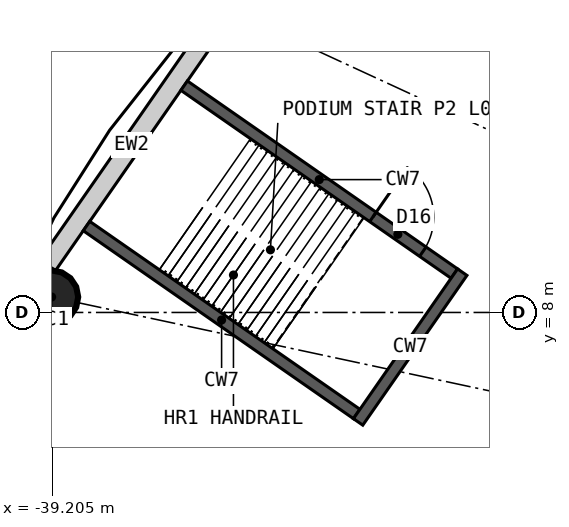
"""IFC4 building model, lengths in metres.
Left out: names, types, materials, properties, quantities, classifications, styles, units other than length and angle.
Written with IfcOpenShell. Run it as: python <this file> out.ifc"""

import sys

from ifc_helpers import new_model, si_unit, direction, frame, frame_2d, origin, origin_2d, place, context, subcontext, project, spatial, rectangle, circle, extrude, element, fill, save


model = new_model("IFC4")
c1 = context("Model", 3, precision=1e-05, world=origin(), true_north=direction((0.0, 1.0)))
c2 = subcontext(c1, "Body", "Model", "MODEL_VIEW")
j1 = project(units=[si_unit("LENGTHUNIT", "METRE"), si_unit("PLANEANGLEUNIT", "RADIAN")], contexts=[c1])
p1 = place(None, origin())
s1 = spatial("IfcSite", under=j1, at=p1, CompositionType="ELEMENT")
p2 = place(p1, origin())
s2 = spatial("IfcBuilding", under=s1, at=p2, CompositionType="ELEMENT")
p3 = place(p2, frame((0.0, 0.0, 7.2)))
s3 = spatial("IfcBuildingStorey", under=s2, at=p3, CompositionType="ELEMENT", Elevation=7.2)
p4 = place(p3, frame((-39.218, 8.407, 0.0), z_axis=(0.0, 0.0, 1.0), x_axis=(1.0, 0.0, 0.0)))
e1 = element("IfcColumn", 1, at=p4, inside=s3, PredefinedType="COLUMN", context=c2, shape_type="SweptSolid", body=[
    extrude(circle(Radius=0.7, at=origin_2d()), origin(), (0.0, 0.0, 1.0), 6.6),
])
p5 = place(p3, frame((-34.905, 15.592, 0.0), z_axis=(0.0, 0.0, 1.0), x_axis=(-0.571029335057, -0.820929655028, 0.0)))
e2 = element("IfcWall", 2, at=p5, inside=s3, PredefinedType="SOLIDWALL", context=c2, shape_type="SweptSolid", body=[
    extrude(rectangle(XDim=7.733, YDim=0.5, at=frame_2d((3.866, 0.0))), origin(), (0.0, 0.0, 1.0), 6.35),
])
p6 = place(p3, frame((-35.729, 13.968, 0.0), z_axis=(0.0, 0.0, 1.0), x_axis=(0.82092761123, -0.571032273274, 0.0)))
e3 = element("IfcWall", 3, at=p6, inside=s3, PredefinedType="SHEAR", context=c2, shape_type="SweptSolid", body=[
    extrude(rectangle(XDim=8.66, YDim=0.3, at=frame_2d((4.33, 0.0))), origin(), (0.0, 0.0, 1.0), 6.6),
])
p7 = place(p6, frame((6.05, 0.0, 0.0)))
e4 = element("IfcOpeningElement", 4, at=p7, cuts=e3, PredefinedType="OPENING", context=c2, shape_type="SweptSolid", body=[
    extrude(rectangle(XDim=1.6, YDim=2.1, at=frame_2d((0.8, 1.05))), frame((0.0, 0.16, 0.0), z_axis=(0.0, -1.0, 0.0), x_axis=(1.0, 0.0, 0.0)), (0.0, 0.0, 1.0), 0.32),
])
p8 = place(p3, frame((-38.299, 10.274, 0.0), z_axis=(0.0, 0.0, 1.0), x_axis=(0.820936803751, -0.571019057692, 0.0)))
e5 = element("IfcWall", 5, at=p8, inside=s3, PredefinedType="SHEAR", context=c2, shape_type="SweptSolid", body=[
    extrude(rectangle(XDim=8.66, YDim=0.3, at=frame_2d((4.33, 0.0))), origin(), (0.0, 0.0, 1.0), 6.6),
])
p9 = place(p3, frame((-28.412, 9.06, 0.0), z_axis=(0.0, 0.0, 1.0), x_axis=(-0.571036173178, -0.820924898467, 0.0)))
e6 = element("IfcWall", 6, at=p9, inside=s3, PredefinedType="SHEAR", context=c2, shape_type="SweptSolid", body=[
    extrude(rectangle(XDim=4.8, YDim=0.3, at=frame_2d((2.4, 0.0))), origin(), (0.0, 0.0, 1.0), 6.6),
])
p10 = place(p7, origin())
e7 = element("IfcDoor", 7, at=p10, inside=s3, OperationType="SINGLE_SWING_LEFT", PredefinedType="DOOR", context=c2, shape_type="SweptSolid", body=[
    extrude(rectangle(XDim=1.6, YDim=2.1, at=frame_2d((0.8, 1.05))), frame((0.0, 0.025, 0.0), z_axis=(0.0, -1.0, 0.0), x_axis=(1.0, 0.0, 0.0)), (0.0, 0.0, 1.0), 0.05),
])
fill(e4, e7)
save(model, sys.argv[1])
